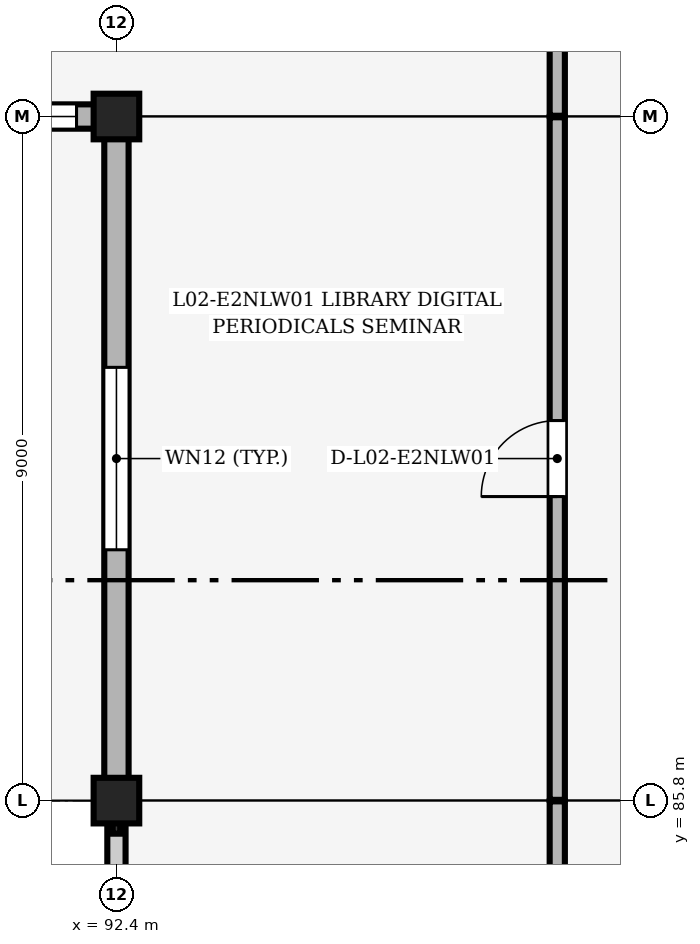
"""IFC4 building model, lengths in metres.
Left out: names, types, materials, properties, quantities, classifications, styles, units other than length and angle.
Written with IfcOpenShell. Run it as: python <this file> out.ifc"""

import sys

from ifc_helpers import new_model, si_unit, direction, frame, frame_2d, origin, origin_2d, place, context, subcontext, project, spatial, rectangle, extrude, element, fill, save


model = new_model("IFC4")
c1 = context("Model", 3, precision=1e-05, world=origin(), true_north=direction((0.0, 1.0)))
c2 = subcontext(c1, "Body", "Model", "MODEL_VIEW")
j1 = project(units=[si_unit("LENGTHUNIT", "METRE"), si_unit("PLANEANGLEUNIT", "RADIAN")], contexts=[c1])
p1 = place(None, origin())
s1 = spatial("IfcSite", under=j1, at=p1, CompositionType="ELEMENT")
p2 = place(p1, origin())
s2 = spatial("IfcBuilding", under=s1, at=p2, CompositionType="ELEMENT")
p3 = place(p2, frame((0.0, 0.0, 9.0)))
s3 = spatial("IfcBuildingStorey", under=s2, at=p3, CompositionType="ELEMENT", Elevation=9.0)
for number, where, z_axis, x_axis in (
    (1, (92.4, 85.8, 0.0), (0.0, 0.0, 1.0), (1.0, 0.0, 0.0)),
    (2, (92.4, 94.8, 0.0), (0.0, 0.0, 1.0), (1.0, 0.0, 0.0)),
):
    element("IfcColumn", number, at=place(p3, frame(where, z_axis=z_axis, x_axis=x_axis)), inside=s3, PredefinedType="COLUMN", context=c2, shape_type="SweptSolid", body=[
        extrude(rectangle(XDim=0.6, YDim=0.6, at=origin_2d()), origin(), (0.0, 0.0, 1.0), 4.2),
    ])
p4 = place(p3, frame((84.25, 94.8, 0.0), z_axis=(0.0, 0.0, 1.0), x_axis=(1.0, 0.0, 0.0)))
e3 = element("IfcWall", 3, at=p4, inside=s3, PredefinedType="SOLIDWALL", context=c2, shape_type="SweptSolid", body=[
    extrude(rectangle(XDim=7.875, YDim=0.32, at=frame_2d((3.938, 0.0))), origin(), (0.0, 0.0, 1.0), 3.31),
])
p5 = place(p4, frame((0.45, 0.0, 0.9)))
e4 = element("IfcOpeningElement", 4, at=p5, cuts=e3, PredefinedType="OPENING", context=c2, shape_type="SweptSolid", body=[
    extrude(rectangle(XDim=1.2, YDim=1.8, at=frame_2d((0.6, 0.9))), frame((0.0, 0.17, 0.0), z_axis=(0.0, -1.0, 0.0), x_axis=(1.0, 0.0, 0.0)), (0.0, 0.0, 1.0), 0.34),
])
p6 = place(p4, frame((5.945, 0.0, 0.9)))
e5 = element("IfcOpeningElement", 5, at=p6, cuts=e3, PredefinedType="OPENING", context=c2, shape_type="SweptSolid", body=[
    extrude(rectangle(XDim=1.68, YDim=2.26, at=frame_2d((0.84, 1.13))), frame((0.0, 0.17, 0.0), z_axis=(0.0, -1.0, 0.0), x_axis=(1.0, 0.0, 0.0)), (0.0, 0.0, 1.0), 0.34),
])
p7 = place(p3, frame((92.4, 86.075, 0.0), z_axis=(0.0, 0.0, 1.0), x_axis=(0.0, 1.0, 0.0)))
e6 = element("IfcWall", 6, at=p7, inside=s3, PredefinedType="SOLIDWALL", context=c2, shape_type="SweptSolid", body=[
    extrude(rectangle(XDim=8.45, YDim=0.32, at=frame_2d((4.225, 0.0))), origin(), (0.0, 0.0, 1.0), 3.29),
])
p8 = place(p7, frame((3.025, 0.0, 0.9)))
e7 = element("IfcOpeningElement", 7, at=p8, cuts=e6, PredefinedType="OPENING", context=c2, shape_type="SweptSolid", body=[
    extrude(rectangle(XDim=2.4, YDim=1.8, at=frame_2d((1.2, 0.9))), frame((0.0, 0.17, 0.0), z_axis=(0.0, -1.0, 0.0), x_axis=(1.0, 0.0, 0.0)), (0.0, 0.0, 1.0), 0.34),
])
p9 = place(p3, frame((92.4, 77.675, 0.0), z_axis=(0.0, 0.0, 1.0), x_axis=(0.0, 1.0, 0.0)))
e8 = element("IfcWall", 8, at=p9, inside=s3, PredefinedType="SOLIDWALL", context=c2, shape_type="SweptSolid", body=[
    extrude(rectangle(XDim=7.85, YDim=0.24, at=frame_2d((3.925, 0.0))), origin(), (0.0, 0.0, 1.0), 1.15),
])
p10 = place(p3, frame((98.2, 94.81, 0.0), z_axis=(0.0, 0.0, 1.0), x_axis=(0.0, 1.0, 0.0)))
e9 = element("IfcWall", 9, at=p10, inside=s3, PredefinedType="PARTITIONING", context=c2, shape_type="SweptSolid", body=[
    extrude(rectangle(XDim=6.085, YDim=0.2, at=frame_2d((3.042, 0.0))), origin(), (0.0, 0.0, 1.0), 3.9),
])
p11 = place(p3, frame((98.2, 85.81, 0.0), z_axis=(0.0, 0.0, 1.0), x_axis=(0.0, 1.0, 0.0)))
e10 = element("IfcWall", 10, at=p11, inside=s3, PredefinedType="PARTITIONING", context=c2, shape_type="SweptSolid", body=[
    extrude(rectangle(XDim=8.98, YDim=0.2, at=frame_2d((4.49, 0.0))), origin(), (0.0, 0.0, 1.0), 3.9),
])
p12 = place(p11, frame((3.99, 0.0, 0.0)))
e11 = element("IfcOpeningElement", 11, at=p12, cuts=e10, PredefinedType="OPENING", context=c2, shape_type="SweptSolid", body=[
    extrude(rectangle(XDim=1.0, YDim=2.15, at=frame_2d((0.5, 1.075))), frame((0.0, 0.11, 0.0), z_axis=(0.0, -1.0, 0.0), x_axis=(1.0, 0.0, 0.0)), (0.0, 0.0, 1.0), 0.22),
])
p13 = place(p3, frame((98.2, 18.165, 0.0), z_axis=(0.0, 0.0, 1.0), x_axis=(0.0, 1.0, 0.0)))
e12 = element("IfcWall", 12, at=p13, inside=s3, PredefinedType="PARTITIONING", context=c2, shape_type="SweptSolid", body=[
    extrude(rectangle(XDim=67.625, YDim=0.2, at=frame_2d((33.812, 0.0))), origin(), (0.0, 0.0, 1.0), 3.9),
])
p14 = place(p13, frame((5.835, 0.0, 0.0)))
e13 = element("IfcOpeningElement", 13, at=p14, cuts=e12, PredefinedType="OPENING", context=c2, shape_type="SweptSolid", body=[
    extrude(rectangle(XDim=1.0, YDim=2.15, at=frame_2d((0.5, 1.075))), frame((0.0, 0.11, 0.0), z_axis=(0.0, -1.0, 0.0), x_axis=(1.0, 0.0, 0.0)), (0.0, 0.0, 1.0), 0.22),
])
p15 = place(p13, frame((18.735, 0.0, 0.0)))
e14 = element("IfcOpeningElement", 14, at=p15, cuts=e12, PredefinedType="OPENING", context=c2, shape_type="SweptSolid", body=[
    extrude(rectangle(XDim=1.0, YDim=2.15, at=frame_2d((0.5, 1.075))), frame((0.0, 0.11, 0.0), z_axis=(0.0, -1.0, 0.0), x_axis=(1.0, 0.0, 0.0)), (0.0, 0.0, 1.0), 0.22),
])
p16 = place(p13, frame((29.335, 0.0, 0.0)))
e15 = element("IfcOpeningElement", 15, at=p16, cuts=e12, PredefinedType="OPENING", context=c2, shape_type="SweptSolid", body=[
    extrude(rectangle(XDim=1.0, YDim=2.15, at=frame_2d((0.5, 1.075))), frame((0.0, 0.11, 0.0), z_axis=(0.0, -1.0, 0.0), x_axis=(1.0, 0.0, 0.0)), (0.0, 0.0, 1.0), 0.22),
])
p17 = place(p13, frame((36.36, 0.0, 0.0)))
e16 = element("IfcOpeningElement", 16, at=p17, cuts=e12, PredefinedType="OPENING", context=c2, shape_type="SweptSolid", body=[
    extrude(rectangle(XDim=0.95, YDim=2.2, at=frame_2d((0.475, 1.1))), frame((0.0, 0.11, 0.0), z_axis=(0.0, -1.0, 0.0), x_axis=(1.0, 0.0, 0.0)), (0.0, 0.0, 1.0), 0.22),
])
p18 = place(p13, frame((41.96, 0.0, 0.0)))
e17 = element("IfcOpeningElement", 17, at=p18, cuts=e12, PredefinedType="OPENING", context=c2, shape_type="SweptSolid", body=[
    extrude(rectangle(XDim=0.95, YDim=2.2, at=frame_2d((0.475, 1.1))), frame((0.0, 0.11, 0.0), z_axis=(0.0, -1.0, 0.0), x_axis=(1.0, 0.0, 0.0)), (0.0, 0.0, 1.0), 0.22),
])
p19 = place(p13, frame((47.56, 0.0, 0.0)))
e18 = element("IfcOpeningElement", 18, at=p19, cuts=e12, PredefinedType="OPENING", context=c2, shape_type="SweptSolid", body=[
    extrude(rectangle(XDim=0.95, YDim=2.1, at=frame_2d((0.475, 1.05))), frame((0.0, 0.11, 0.0), z_axis=(0.0, -1.0, 0.0), x_axis=(1.0, 0.0, 0.0)), (0.0, 0.0, 1.0), 0.22),
])
p20 = place(p13, frame((54.535, 0.0, 0.0)))
e19 = element("IfcOpeningElement", 19, at=p20, cuts=e12, PredefinedType="OPENING", context=c2, shape_type="SweptSolid", body=[
    extrude(rectangle(XDim=1.0, YDim=2.15, at=frame_2d((0.5, 1.075))), frame((0.0, 0.11, 0.0), z_axis=(0.0, -1.0, 0.0), x_axis=(1.0, 0.0, 0.0)), (0.0, 0.0, 1.0), 0.22),
])
p21 = place(p13, frame((62.935, 0.0, 0.0)))
e20 = element("IfcOpeningElement", 20, at=p21, cuts=e12, PredefinedType="OPENING", context=c2, shape_type="SweptSolid", body=[
    extrude(rectangle(XDim=1.0, YDim=2.15, at=frame_2d((0.5, 1.075))), frame((0.0, 0.11, 0.0), z_axis=(0.0, -1.0, 0.0), x_axis=(1.0, 0.0, 0.0)), (0.0, 0.0, 1.0), 0.22),
])
p22 = place(p6, origin())
e21 = element("IfcWindow", 21, at=p22, inside=s3, PartitioningType="SINGLE_PANEL", PredefinedType="WINDOW", context=c2, shape_type="SweptSolid", body=[
    extrude(rectangle(XDim=1.68, YDim=2.26, at=frame_2d((0.84, 1.13))), frame((0.0, 0.03, 0.0), z_axis=(0.0, -1.0, 0.0), x_axis=(1.0, 0.0, 0.0)), (0.0, 0.0, 1.0), 0.06),
])
fill(e5, e21)
p23 = place(p8, origin())
e22 = element("IfcWindow", 22, at=p23, inside=s3, PartitioningType="SINGLE_PANEL", PredefinedType="WINDOW", context=c2, shape_type="SweptSolid", body=[
    extrude(rectangle(XDim=2.4, YDim=1.8, at=frame_2d((1.2, 0.9))), frame((0.0, 0.03, 0.0), z_axis=(0.0, -1.0, 0.0), x_axis=(1.0, 0.0, 0.0)), (0.0, 0.0, 1.0), 0.06),
])
fill(e7, e22)
p24 = place(p12, origin())
e23 = element("IfcDoor", 23, at=p24, inside=s3, OperationType="SINGLE_SWING_LEFT", PredefinedType="DOOR", context=c2, shape_type="SweptSolid", body=[
    extrude(rectangle(XDim=1.0, YDim=2.15, at=frame_2d((0.5, 1.075))), frame((0.0, 0.025, 0.0), z_axis=(0.0, -1.0, 0.0), x_axis=(1.0, 0.0, 0.0)), (0.0, 0.0, 1.0), 0.05),
])
fill(e11, e23)
save(model, sys.argv[1])
